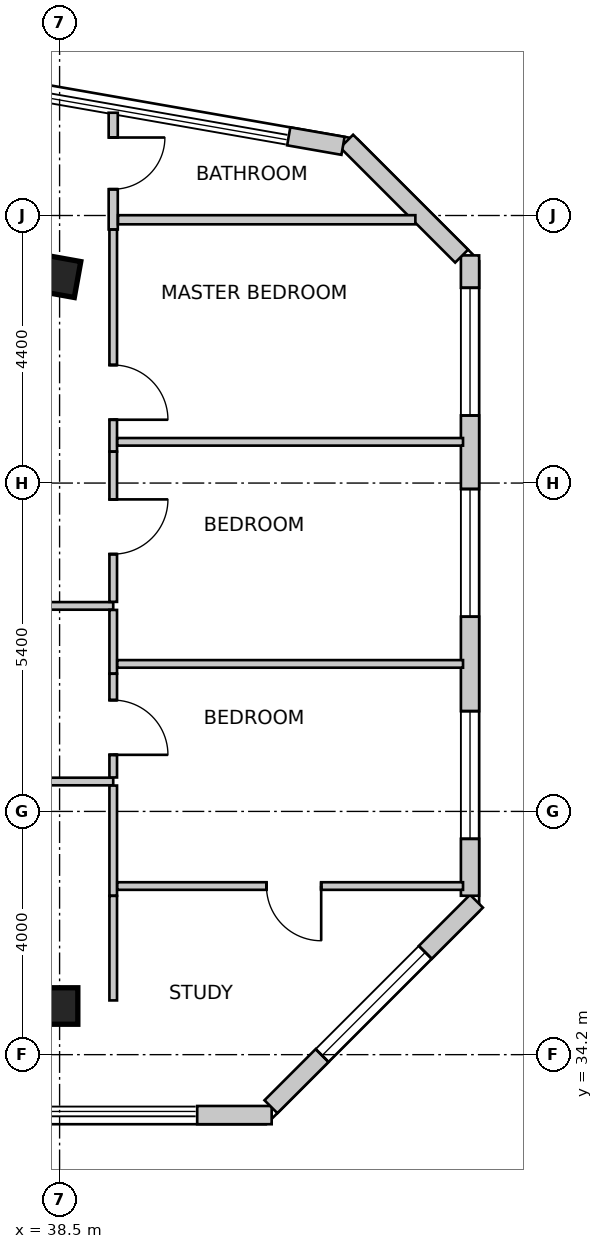
"""IFC4 building model, lengths in metres.
Left out: names, types, materials, properties, quantities, classifications, styles, units other than length and angle.
Written with IfcOpenShell. Run it as: python <this file> out.ifc"""

import sys

from ifc_helpers import new_model, si_unit, direction, frame, frame_2d, origin, origin_2d, place, context, subcontext, project, spatial, rectangle, extrude, source, transform, mapped, element, fill, save


model = new_model("IFC4")
c1 = context("Model", 3, precision=1e-05, world=origin(), true_north=direction((0.0, 1.0)))
c2 = subcontext(c1, "Body", "Model", "MODEL_VIEW")
j1 = project(units=[si_unit("LENGTHUNIT", "METRE"), si_unit("PLANEANGLEUNIT", "RADIAN")], contexts=[c1])
p1 = place(None, origin())
s1 = spatial("IfcSite", under=j1, at=p1, CompositionType="ELEMENT")
p2 = place(p1, origin())
s2 = spatial("IfcBuilding", under=s1, at=p2, CompositionType="ELEMENT")
p3 = place(p2, frame((0.0, 0.0, 249.3)))
s3 = spatial("IfcBuildingStorey", under=s2, at=p3, CompositionType="ELEMENT", Elevation=249.3)
m1 = source(origin(), c2, "Body", "SweptSolid", [
    extrude(rectangle(XDim=0.6, YDim=0.6, at=origin_2d()), origin(), (0.0, 0.0, 1.0), 3.6),
])
for number, where, z_axis, x_axis in (
    (1, (38.5, 47.0, 0.0), (0.0, 0.0, 1.0), (0.984, -0.177, 0.0)),
    (2, (38.5, 35.0, 0.0), (0.0, 0.0, 1.0), (1.0, 0.0, 0.0)),
):
    element("IfcColumn", number, at=place(p3, frame(where, z_axis=z_axis, x_axis=x_axis)), inside=s3, PredefinedType="COLUMN", context=c2, shape_type="MappedRepresentation", body=[
        mapped(m1, transform((0.0, 0.0, 0.0), scale=1.0)),
    ])
p4 = place(p3, frame((40.763, 33.206, 0.0), z_axis=(0.0, 0.0, 1.0), x_axis=(1.0, 0.0, 0.0)))
e3 = element("IfcWall", 3, at=p4, inside=s3, PredefinedType="SOLIDWALL", context=c2, shape_type="SweptSolid", body=[
    extrude(rectangle(XDim=1.225, YDim=0.3, at=frame_2d((0.612, 0.0))), origin(), (0.0, 0.0, 1.0), 3.35),
])
p5 = place(p3, frame((41.976, 33.344, 0.0), z_axis=(0.0, 0.0, 1.0), x_axis=(0.707132316343, 0.707081245108, 0.0)))
e4 = element("IfcWall", 4, at=p5, inside=s3, PredefinedType="SOLIDWALL", context=c2, shape_type="SweptSolid", body=[
    extrude(rectangle(XDim=4.78, YDim=0.3, at=frame_2d((2.39, 0.0))), origin(), (0.0, 0.0, 1.0), 3.35),
])
m2 = source(origin(), c2, "Body", "SweptSolid", [
    extrude(rectangle(XDim=2.4, YDim=2.2, at=frame_2d((1.2, 1.1))), frame((0.0, 0.16, 0.0), z_axis=(0.0, -1.0, 0.0), x_axis=(1.0, 0.0, 0.0)), (0.0, 0.0, 1.0), 0.32),
])
p6 = place(p5, frame((1.19, 0.0, 0.85)))
e5 = element("IfcOpeningElement", 5, at=p6, cuts=e4, PredefinedType="OPENING", context=c2, shape_type="MappedRepresentation", body=[
    mapped(m2, transform((0.0, 0.0, 0.0), scale=1.0)),
])
p7 = place(p3, frame((45.25, 36.813, 0.0), z_axis=(0.0, 0.0, 1.0), x_axis=(0.0, 1.0, 0.0)))
e6 = element("IfcWall", 6, at=p7, inside=s3, PredefinedType="SOLIDWALL", context=c2, shape_type="SweptSolid", body=[
    extrude(rectangle(XDim=10.531, YDim=0.3, at=frame_2d((5.265, 0.0))), origin(), (0.0, 0.0, 1.0), 3.35),
])
m3 = source(origin(), c2, "Body", "SweptSolid", [
    extrude(rectangle(XDim=2.1, YDim=2.0, at=frame_2d((1.05, 1.0))), frame((0.0, 0.16, 0.0), z_axis=(0.0, -1.0, 0.0), x_axis=(1.0, 0.0, 0.0)), (0.0, 0.0, 1.0), 0.32),
])
p8 = place(p7, frame((0.936, 0.0, 0.85)))
e7 = element("IfcOpeningElement", 7, at=p8, cuts=e6, PredefinedType="OPENING", context=c2, shape_type="MappedRepresentation", body=[
    mapped(m3, transform((0.0, 0.0, 0.0), scale=1.0)),
])
p9 = place(p7, frame((4.589, 0.0, 0.85)))
e8 = element("IfcOpeningElement", 8, at=p9, cuts=e6, PredefinedType="OPENING", context=c2, shape_type="MappedRepresentation", body=[
    mapped(m3, transform((0.0, 0.0, 0.0), scale=1.0)),
])
p10 = place(p7, frame((7.898, 0.0, 0.85)))
e9 = element("IfcOpeningElement", 9, at=p10, cuts=e6, PredefinedType="OPENING", context=c2, shape_type="MappedRepresentation", body=[
    mapped(m3, transform((0.0, 0.0, 0.0), scale=1.0)),
])
p11 = place(p3, frame((45.112, 47.332, 0.0), z_axis=(0.0, 0.0, 1.0), x_axis=(-0.707106781187, 0.707106781187, 0.0)))
e10 = element("IfcWall", 10, at=p11, inside=s3, PredefinedType="SOLIDWALL", context=c2, shape_type="SweptSolid", body=[
    extrude(rectangle(XDim=2.674, YDim=0.3, at=frame_2d((1.337, 0.0))), origin(), (0.0, 0.0, 1.0), 3.35),
])
p12 = place(p3, frame((43.161, 49.146, 0.0), z_axis=(0.0, 0.0, 1.0), x_axis=(-0.985029323725, 0.172386865514, 0.0)))
e11 = element("IfcWall", 11, at=p12, inside=s3, PredefinedType="SOLIDWALL", context=c2, shape_type="SweptSolid", body=[
    extrude(rectangle(XDim=0.906, YDim=0.3, at=frame_2d((0.453, 0.0))), origin(), (0.0, 0.0, 1.0), 3.35),
])
p13 = place(p3, frame((33.244, 38.692, 0.0), z_axis=(0.0, 0.0, 1.0), x_axis=(1.0, 0.0, 0.0)))
e12 = element("IfcWall", 12, at=p13, inside=s3, PredefinedType="PARTITIONING", context=c2, shape_type="SweptSolid", body=[
    extrude(rectangle(XDim=6.138, YDim=0.125, at=frame_2d((3.069, 0.0))), origin(), (0.0, 0.0, 1.0), 2.935),
])
m4 = source(origin(), c2, "Body", "SweptSolid", [
    extrude(rectangle(XDim=0.9, YDim=2.15, at=frame_2d((0.45, 1.075))), frame((0.0, 0.073, 0.0), z_axis=(0.0, -1.0, 0.0), x_axis=(1.0, 0.0, 0.0)), (0.0, 0.0, 1.0), 0.145),
])
p14 = place(p13, frame((2.619, 0.0, 0.0)))
e13 = element("IfcOpeningElement", 13, at=p14, cuts=e12, PredefinedType="OPENING", context=c2, shape_type="MappedRepresentation", body=[
    mapped(m4, transform((0.0, 0.0, 0.0), scale=1.0)),
])
p15 = place(p3, frame((39.382, 38.625, 0.0), z_axis=(0.0, 0.0, 1.0), x_axis=(0.0, -1.0, 0.0)))
e14 = element("IfcWall", 14, at=p15, inside=s3, PredefinedType="PARTITIONING", context=c2, shape_type="SweptSolid", body=[
    extrude(rectangle(XDim=1.812, YDim=0.125, at=frame_2d((0.906, 0.0))), origin(), (0.0, 0.0, 1.0), 3.35),
])
p16 = place(p3, frame((39.382, 36.811, 0.0), z_axis=(0.0, 0.0, 1.0), x_axis=(0.0, -1.0, 0.0)))
e15 = element("IfcWall", 15, at=p16, inside=s3, PredefinedType="PARTITIONING", context=c2, shape_type="SweptSolid", body=[
    extrude(rectangle(XDim=1.719, YDim=0.125, at=frame_2d((0.859, 0.0))), origin(), (0.0, 0.0, 1.0), 3.35),
])
p17 = place(p3, frame((39.382, 41.58, 0.0), z_axis=(0.0, 0.0, 1.0), x_axis=(-1.0, 0.0, 0.0)))
e16 = element("IfcWall", 16, at=p17, inside=s3, PredefinedType="PARTITIONING", context=c2, shape_type="SweptSolid", body=[
    extrude(rectangle(XDim=6.138, YDim=0.125, at=frame_2d((3.069, 0.0))), origin(), (0.0, 0.0, 1.0), 2.935),
])
m5 = source(origin(), c2, "Body", "SweptSolid", [
    extrude(rectangle(XDim=0.85, YDim=2.15, at=frame_2d((0.425, 1.075))), frame((0.0, 0.073, 0.0), z_axis=(0.0, -1.0, 0.0), x_axis=(1.0, 0.0, 0.0)), (0.0, 0.0, 1.0), 0.145),
])
p18 = place(p17, frame((2.583, 0.0, 0.0)))
e17 = element("IfcOpeningElement", 17, at=p18, cuts=e16, PredefinedType="OPENING", context=c2, shape_type="MappedRepresentation", body=[
    mapped(m5, transform((0.0, 0.0, 0.0), scale=1.0)),
])
p19 = place(p3, frame((39.382, 49.69, 0.0), z_axis=(0.0, 0.0, 1.0), x_axis=(0.0, -1.0, 0.0)))
e18 = element("IfcWall", 18, at=p19, inside=s3, PredefinedType="PARTITIONING", context=c2, shape_type="SweptSolid", body=[
    extrude(rectangle(XDim=1.92, YDim=0.15, at=frame_2d((0.96, 0.0))), origin(), (0.0, 0.0, 1.0), 3.35),
])
m6 = source(origin(), c2, "Body", "SweptSolid", [
    extrude(rectangle(XDim=0.85, YDim=2.15, at=frame_2d((0.425, 1.075))), frame((0.0, 0.085, 0.0), z_axis=(0.0, -1.0, 0.0), x_axis=(1.0, 0.0, 0.0)), (0.0, 0.0, 1.0), 0.17),
])
p20 = place(p19, frame((0.407, 0.0, 0.0)))
e19 = element("IfcOpeningElement", 19, at=p20, cuts=e18, PredefinedType="OPENING", context=c2, shape_type="MappedRepresentation", body=[
    mapped(m6, transform((0.0, 0.0, 0.0), scale=1.0)),
])
p21 = place(p3, frame((39.382, 47.768, 0.0), z_axis=(0.0, 0.0, 1.0), x_axis=(0.0, -1.0, 0.0)))
e20 = element("IfcWall", 20, at=p21, inside=s3, PredefinedType="PARTITIONING", context=c2, shape_type="SweptSolid", body=[
    extrude(rectangle(XDim=3.65, YDim=0.125, at=frame_2d((1.825, 0.0))), origin(), (0.0, 0.0, 1.0), 3.35),
])
p22 = place(p21, frame((2.227, 0.0, 0.0)))
e21 = element("IfcOpeningElement", 21, at=p22, cuts=e20, PredefinedType="OPENING", context=c2, shape_type="MappedRepresentation", body=[
    mapped(m4, transform((0.0, 0.0, 0.0), scale=1.0)),
])
p23 = place(p3, frame((39.382, 44.116, 0.0), z_axis=(0.0, 0.0, 1.0), x_axis=(0.0, -1.0, 0.0)))
e22 = element("IfcWall", 22, at=p23, inside=s3, PredefinedType="PARTITIONING", context=c2, shape_type="SweptSolid", body=[
    extrude(rectangle(XDim=2.469, YDim=0.125, at=frame_2d((1.235, 0.0))), origin(), (0.0, 0.0, 1.0), 3.35),
])
p24 = place(p23, frame((0.785, 0.0, 0.0)))
e23 = element("IfcOpeningElement", 23, at=p24, cuts=e22, PredefinedType="OPENING", context=c2, shape_type="MappedRepresentation", body=[
    mapped(m4, transform((0.0, 0.0, 0.0), scale=1.0)),
])
p25 = place(p3, frame((39.382, 41.513, 0.0), z_axis=(0.0, 0.0, 1.0), x_axis=(0.0, -1.0, 0.0)))
e24 = element("IfcWall", 24, at=p25, inside=s3, PredefinedType="PARTITIONING", context=c2, shape_type="SweptSolid", body=[
    extrude(rectangle(XDim=1.047, YDim=0.125, at=frame_2d((0.524, 0.0))), origin(), (0.0, 0.0, 1.0), 3.35),
])
p26 = place(p3, frame((39.382, 40.464, 0.0), z_axis=(0.0, 0.0, 1.0), x_axis=(0.0, -1.0, 0.0)))
e25 = element("IfcWall", 25, at=p26, inside=s3, PredefinedType="PARTITIONING", context=c2, shape_type="SweptSolid", body=[
    extrude(rectangle(XDim=1.706, YDim=0.125, at=frame_2d((0.853, 0.0))), origin(), (0.0, 0.0, 1.0), 3.35),
])
p27 = place(p26, frame((0.433, 0.0, 0.0)))
e26 = element("IfcOpeningElement", 26, at=p27, cuts=e25, PredefinedType="OPENING", context=c2, shape_type="MappedRepresentation", body=[
    mapped(m4, transform((0.0, 0.0, 0.0), scale=1.0)),
])
p28 = place(p3, frame((44.351, 47.93, 0.0), z_axis=(0.0, 0.0, 1.0), x_axis=(-1.0, 0.0, 0.0)))
e27 = element("IfcWall", 27, at=p28, inside=s3, PredefinedType="PARTITIONING", context=c2, shape_type="SweptSolid", body=[
    extrude(rectangle(XDim=4.89, YDim=0.15, at=frame_2d((2.445, 0.0))), origin(), (0.0, 0.0, 1.0), 3.35),
])
for number, where, z_axis, x_axis in (
    (28, (45.135, 44.278, 0.0), (0.0, 0.0, 1.0), (-1.0, 0.0, 0.0)),
    (29, (45.135, 40.626, 0.0), (0.0, 0.0, 1.0), (-1.0, 0.0, 0.0)),
):
    element("IfcWall", number, at=place(p3, frame(where, z_axis=z_axis, x_axis=x_axis)), inside=s3, PredefinedType="PARTITIONING", context=c2, shape_type="SweptSolid", body=[
        extrude(rectangle(XDim=5.687, YDim=0.125, at=frame_2d((2.843, 0.0))), origin(), (0.0, 0.0, 1.0), 3.35),
    ])
p29 = place(p3, frame((45.135, 36.973, 0.0), z_axis=(0.0, 0.0, 1.0), x_axis=(-1.0, 0.0, 0.0)))
e30 = element("IfcWall", 30, at=p29, inside=s3, PredefinedType="PARTITIONING", context=c2, shape_type="SweptSolid", body=[
    extrude(rectangle(XDim=5.687, YDim=0.125, at=frame_2d((2.843, 0.0))), origin(), (0.0, 0.0, 1.0), 3.35),
])
p30 = place(p29, frame((2.333, 0.0, 0.0)))
e31 = element("IfcOpeningElement", 31, at=p30, cuts=e30, PredefinedType="OPENING", context=c2, shape_type="MappedRepresentation", body=[
    mapped(m4, transform((0.0, 0.0, 0.0), scale=1.0)),
])
m7 = source(origin(), c2, "Body", "SweptSolid", [
    extrude(rectangle(XDim=2.4, YDim=2.2, at=frame_2d((1.2, 1.1))), frame((0.0, -0.015, 0.0), z_axis=(0.0, -1.0, 0.0), x_axis=(1.0, 0.0, 0.0)), (0.0, 0.0, 1.0), 0.06),
])
p31 = place(p6, origin())
e32 = element("IfcWindow", 32, at=p31, inside=s3, PartitioningType="SINGLE_PANEL", PredefinedType="WINDOW", context=c2, shape_type="MappedRepresentation", body=[
    mapped(m7, transform((0.0, 0.0, 0.0), scale=1.0)),
])
fill(e5, e32)
m8 = source(origin(), c2, "Body", "SweptSolid", [
    extrude(rectangle(XDim=2.1, YDim=2.0, at=frame_2d((1.05, 1.0))), frame((0.0, -0.015, 0.0), z_axis=(0.0, -1.0, 0.0), x_axis=(1.0, 0.0, 0.0)), (0.0, 0.0, 1.0), 0.06),
])
p32 = place(p8, origin())
e33 = element("IfcWindow", 33, at=p32, inside=s3, PartitioningType="SINGLE_PANEL", PredefinedType="WINDOW", context=c2, shape_type="MappedRepresentation", body=[
    mapped(m8, transform((0.0, 0.0, 0.0), scale=1.0)),
])
fill(e7, e33)
p33 = place(p9, origin())
e34 = element("IfcWindow", 34, at=p33, inside=s3, PartitioningType="SINGLE_PANEL", PredefinedType="WINDOW", context=c2, shape_type="MappedRepresentation", body=[
    mapped(m8, transform((0.0, 0.0, 0.0), scale=1.0)),
])
fill(e8, e34)
p34 = place(p10, origin())
e35 = element("IfcWindow", 35, at=p34, inside=s3, PartitioningType="SINGLE_PANEL", PredefinedType="WINDOW", context=c2, shape_type="MappedRepresentation", body=[
    mapped(m8, transform((0.0, 0.0, 0.0), scale=1.0)),
])
fill(e9, e35)
m9 = source(origin(), c2, "Body", "SweptSolid", [
    extrude(rectangle(XDim=0.85, YDim=2.15, at=frame_2d((0.425, 1.075))), frame((0.0, 0.025, 0.0), z_axis=(0.0, -1.0, 0.0), x_axis=(1.0, 0.0, 0.0)), (0.0, 0.0, 1.0), 0.05),
])
p35 = place(p20, origin())
e36 = element("IfcDoor", 36, at=p35, inside=s3, OperationType="SINGLE_SWING_LEFT", PredefinedType="DOOR", context=c2, shape_type="MappedRepresentation", body=[
    mapped(m9, transform((0.0, 0.0, 0.0), scale=1.0)),
])
fill(e19, e36)
m10 = source(origin(), c2, "Body", "SweptSolid", [
    extrude(rectangle(XDim=0.9, YDim=2.15, at=frame_2d((0.45, 1.075))), frame((0.0, 0.025, 0.0), z_axis=(0.0, -1.0, 0.0), x_axis=(1.0, 0.0, 0.0)), (0.0, 0.0, 1.0), 0.05),
])
p36 = place(p22, origin())
e37 = element("IfcDoor", 37, at=p36, inside=s3, OperationType="SINGLE_SWING_RIGHT", PredefinedType="DOOR", context=c2, shape_type="MappedRepresentation", body=[
    mapped(m10, transform((0.0, 0.0, 0.0), scale=1.0)),
])
fill(e21, e37)
p37 = place(p24, origin())
e38 = element("IfcDoor", 38, at=p37, inside=s3, OperationType="SINGLE_SWING_LEFT", PredefinedType="DOOR", context=c2, shape_type="MappedRepresentation", body=[
    mapped(m10, transform((0.0, 0.0, 0.0), scale=1.0)),
])
fill(e23, e38)
p38 = place(p27, origin())
e39 = element("IfcDoor", 39, at=p38, inside=s3, OperationType="SINGLE_SWING_RIGHT", PredefinedType="DOOR", context=c2, shape_type="MappedRepresentation", body=[
    mapped(m10, transform((0.0, 0.0, 0.0), scale=1.0)),
])
fill(e26, e39)
p39 = place(p30, origin())
e40 = element("IfcDoor", 40, at=p39, inside=s3, OperationType="SINGLE_SWING_LEFT", PredefinedType="DOOR", context=c2, shape_type="MappedRepresentation", body=[
    mapped(m10, transform((0.0, 0.0, 0.0), scale=1.0)),
])
fill(e31, e40)
save(model, sys.argv[1])
